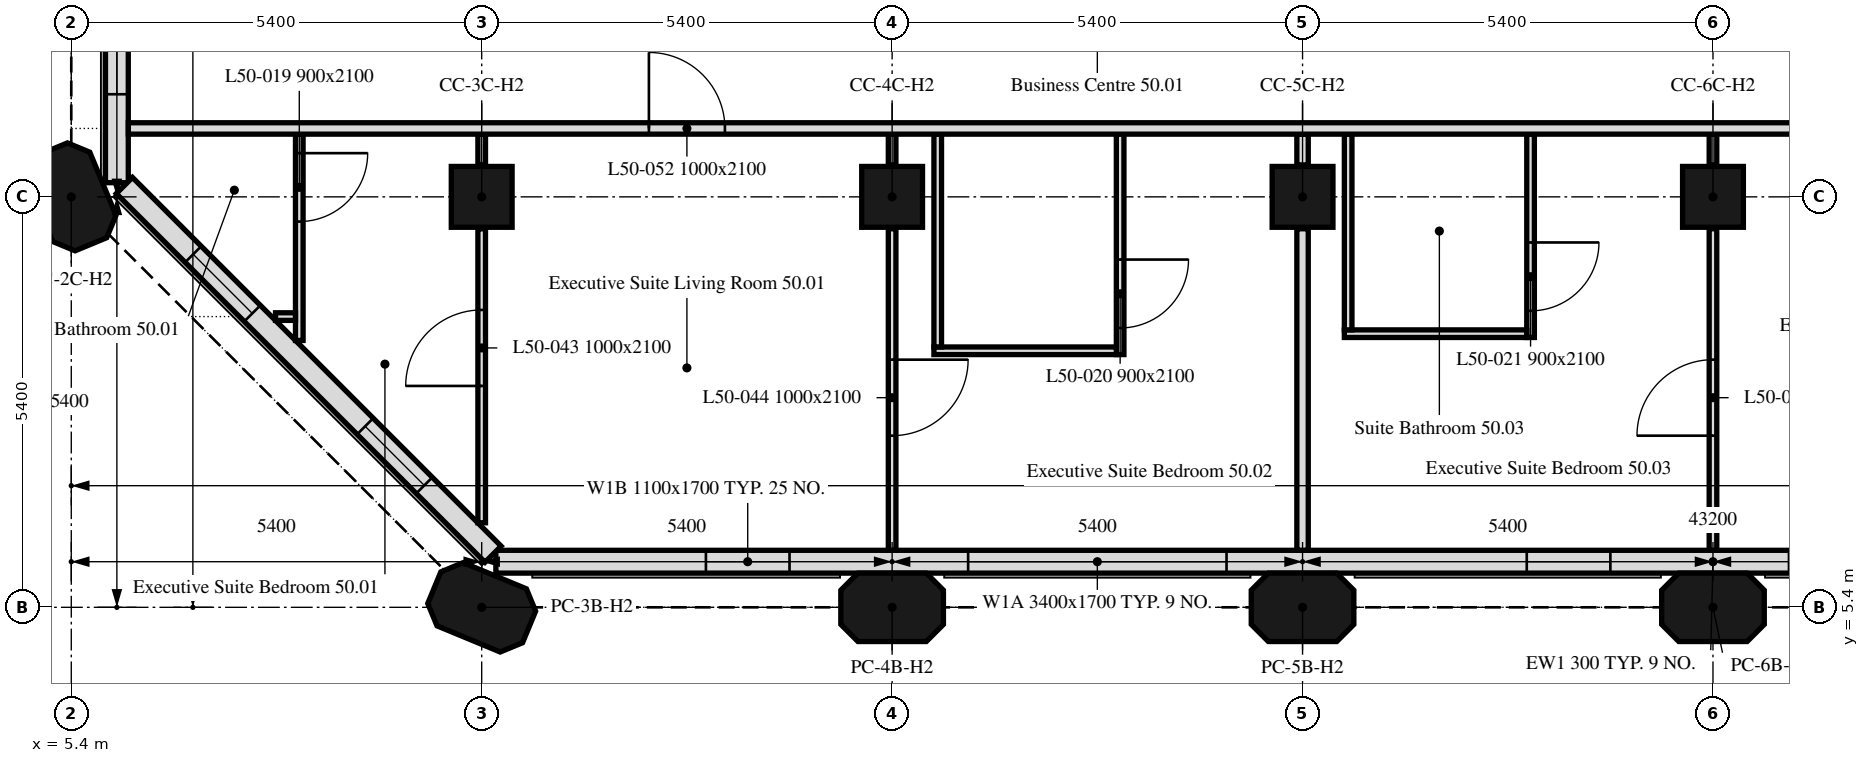
"""IFC4 building model, lengths in metres.
Left out: names, types, materials, properties, quantities, classifications, styles, units other than length and angle.
Written with IfcOpenShell. Run it as: python <this file> out.ifc"""

import sys

from ifc_helpers import new_model, si_unit, direction, frame, frame_2d, origin, origin_2d, place, context, subcontext, project, spatial, polyline, rectangle, outline, extrude, element, fill, save


model = new_model("IFC4")
c1 = context("Model", 3, precision=1e-05, world=origin(), true_north=direction((0.0, 1.0)))
c2 = subcontext(c1, "Body", "Model", "MODEL_VIEW")
j1 = project(units=[si_unit("LENGTHUNIT", "METRE"), si_unit("PLANEANGLEUNIT", "RADIAN")], contexts=[c1])
p1 = place(None, origin())
s1 = spatial("IfcSite", under=j1, at=p1, CompositionType="ELEMENT")
p2 = place(p1, origin())
s2 = spatial("IfcBuilding", under=s1, at=p2, CompositionType="ELEMENT")
p3 = place(p2, frame((0.0, 0.0, 203.8)))
s3 = spatial("IfcBuildingStorey", under=s2, at=p3, CompositionType="ELEMENT", Elevation=203.8)
for number, where, z_axis, x_axis in (
    (1, (10.8, 5.4, 0.0), (0.0, 0.0, 1.0), (-0.924, 0.383, 0.0)),
    (2, (16.2, 5.4, 0.0), (0.0, 0.0, 1.0), (1.0, 0.0, 0.0)),
    (3, (21.6, 5.4, 0.0), (0.0, 0.0, 1.0), (1.0, 0.0, 0.0)),
    (4, (27.0, 5.4, 0.0), (0.0, 0.0, 1.0), (1.0, 0.0, 0.0)),
    (5, (5.4, 10.8, 0.0), (0.0, 0.0, 1.0), (-0.383, 0.924, 0.0)),
):
    element("IfcColumn", number, at=place(p3, frame(where, z_axis=z_axis, x_axis=x_axis)), inside=s3, PredefinedType="COLUMN", context=c2, shape_type="SweptSolid", body=[
        extrude(outline(polyline([(-0.45, -0.45), (0.45, -0.45), (0.675, -0.225), (0.675, 0.225), (0.45, 0.45), (-0.45, 0.45), (-0.675, 0.225), (-0.675, -0.225), (-0.45, -0.45)])), origin(), (0.0, 0.0, 1.0), 3.0),
    ])
for number, where, z_axis, x_axis in (
    (6, (10.8, 10.8, 0.0), (0.0, 0.0, 1.0), (1.0, 0.0, 0.0)),
    (7, (16.2, 10.8, 0.0), (0.0, 0.0, 1.0), (1.0, 0.0, 0.0)),
    (8, (21.6, 10.8, 0.0), (0.0, 0.0, 1.0), (1.0, 0.0, 0.0)),
    (9, (27.0, 10.8, 0.0), (0.0, 0.0, 1.0), (1.0, 0.0, 0.0)),
):
    element("IfcColumn", number, at=place(p3, frame(where, z_axis=z_axis, x_axis=x_axis)), inside=s3, PredefinedType="COLUMN", context=c2, shape_type="SweptSolid", body=[
        extrude(rectangle(XDim=0.8, YDim=0.8, at=origin_2d()), origin(), (0.0, 0.0, 1.0), 3.0),
    ])
p4 = place(p3, frame((10.986, 6.0, 0.0), z_axis=(0.0, 0.0, 1.0), x_axis=(1.0, 0.0, 0.0)))
e10 = element("IfcWall", 10, at=p4, inside=s3, PredefinedType="SOLIDWALL", context=c2, shape_type="SweptSolid", body=[
    extrude(rectangle(XDim=32.027, YDim=0.3, at=frame_2d((16.014, 0.0))), origin(), (0.0, 0.0, 1.0), 3.0),
])
p5 = place(p4, frame((2.764, 0.0, 0.9)))
e11 = element("IfcOpeningElement", 11, at=p5, cuts=e10, PredefinedType="OPENING", context=c2, shape_type="SweptSolid", body=[
    extrude(rectangle(XDim=1.1, YDim=1.7, at=frame_2d((0.55, 0.85))), frame((0.0, 0.16, 0.0), z_axis=(0.0, -1.0, 0.0), x_axis=(1.0, 0.0, 0.0)), (0.0, 0.0, 1.0), 0.32),
])
p6 = place(p4, frame((6.214, 0.0, 0.9)))
e12 = element("IfcOpeningElement", 12, at=p6, cuts=e10, PredefinedType="OPENING", context=c2, shape_type="SweptSolid", body=[
    extrude(rectangle(XDim=3.4, YDim=1.7, at=frame_2d((1.7, 0.85))), frame((0.0, 0.16, 0.0), z_axis=(0.0, -1.0, 0.0), x_axis=(1.0, 0.0, 0.0)), (0.0, 0.0, 1.0), 0.32),
])
p7 = place(p4, frame((13.564, 0.0, 0.9)))
e13 = element("IfcOpeningElement", 13, at=p7, cuts=e10, PredefinedType="OPENING", context=c2, shape_type="SweptSolid", body=[
    extrude(rectangle(XDim=1.1, YDim=1.7, at=frame_2d((0.55, 0.85))), frame((0.0, 0.16, 0.0), z_axis=(0.0, -1.0, 0.0), x_axis=(1.0, 0.0, 0.0)), (0.0, 0.0, 1.0), 0.32),
])
p8 = place(p4, frame((17.014, 0.0, 0.9)))
e14 = element("IfcOpeningElement", 14, at=p8, cuts=e10, PredefinedType="OPENING", context=c2, shape_type="SweptSolid", body=[
    extrude(rectangle(XDim=3.4, YDim=1.7, at=frame_2d((1.7, 0.85))), frame((0.0, 0.16, 0.0), z_axis=(0.0, -1.0, 0.0), x_axis=(1.0, 0.0, 0.0)), (0.0, 0.0, 1.0), 0.32),
])
p9 = place(p4, frame((24.364, 0.0, 0.9)))
e15 = element("IfcOpeningElement", 15, at=p9, cuts=e10, PredefinedType="OPENING", context=c2, shape_type="SweptSolid", body=[
    extrude(rectangle(XDim=1.1, YDim=1.7, at=frame_2d((0.55, 0.85))), frame((0.0, 0.16, 0.0), z_axis=(0.0, -1.0, 0.0), x_axis=(1.0, 0.0, 0.0)), (0.0, 0.0, 1.0), 0.32),
])
p10 = place(p4, frame((27.814, 0.0, 0.9)))
e16 = element("IfcOpeningElement", 16, at=p10, cuts=e10, PredefinedType="OPENING", context=c2, shape_type="SweptSolid", body=[
    extrude(rectangle(XDim=3.4, YDim=1.7, at=frame_2d((1.7, 0.85))), frame((0.0, 0.16, 0.0), z_axis=(0.0, -1.0, 0.0), x_axis=(1.0, 0.0, 0.0)), (0.0, 0.0, 1.0), 0.32),
])
p11 = place(p3, frame((6.0, 16.2, 0.0), z_axis=(0.0, 0.0, 1.0), x_axis=(0.0, -1.0, 0.0)))
e17 = element("IfcWall", 17, at=p11, inside=s3, PredefinedType="SOLIDWALL", context=c2, shape_type="SweptSolid", body=[
    extrude(rectangle(XDim=5.214, YDim=0.3, at=frame_2d((2.607, 0.0))), origin(), (0.0, 0.0, 1.0), 3.0),
])
p12 = place(p11, frame((1.35, 0.0, 0.9)))
e18 = element("IfcOpeningElement", 18, at=p12, cuts=e17, PredefinedType="OPENING", context=c2, shape_type="SweptSolid", body=[
    extrude(rectangle(XDim=1.1, YDim=1.7, at=frame_2d((0.55, 0.85))), frame((0.0, 0.16, 0.0), z_axis=(0.0, -1.0, 0.0), x_axis=(1.0, 0.0, 0.0)), (0.0, 0.0, 1.0), 0.32),
])
p13 = place(p11, frame((2.95, 0.0, 0.9)))
e19 = element("IfcOpeningElement", 19, at=p13, cuts=e17, PredefinedType="OPENING", context=c2, shape_type="SweptSolid", body=[
    extrude(rectangle(XDim=1.1, YDim=1.7, at=frame_2d((0.55, 0.85))), frame((0.0, 0.16, 0.0), z_axis=(0.0, -1.0, 0.0), x_axis=(1.0, 0.0, 0.0)), (0.0, 0.0, 1.0), 0.32),
])
p14 = place(p3, frame((6.099, 10.949, 0.0), z_axis=(0.0, 0.0, 1.0), x_axis=(0.707106781187, -0.707106781187, 0.0)))
e20 = element("IfcWall", 20, at=p14, inside=s3, PredefinedType="SOLIDWALL", context=c2, shape_type="SweptSolid", body=[
    extrude(rectangle(XDim=6.86, YDim=0.3, at=frame_2d((3.43, 0.0))), origin(), (0.0, 0.0, 1.0), 3.0),
])
p15 = place(p14, frame((1.28, 0.0, 0.9)))
e21 = element("IfcOpeningElement", 21, at=p15, cuts=e20, PredefinedType="OPENING", context=c2, shape_type="SweptSolid", body=[
    extrude(rectangle(XDim=1.1, YDim=1.7, at=frame_2d((0.55, 0.85))), frame((0.0, 0.16, 0.0), z_axis=(0.0, -1.0, 0.0), x_axis=(1.0, 0.0, 0.0)), (0.0, 0.0, 1.0), 0.32),
])
p16 = place(p14, frame((4.48, 0.0, 0.9)))
e22 = element("IfcOpeningElement", 22, at=p16, cuts=e20, PredefinedType="OPENING", context=c2, shape_type="SweptSolid", body=[
    extrude(rectangle(XDim=1.1, YDim=1.7, at=frame_2d((0.55, 0.85))), frame((0.0, 0.16, 0.0), z_axis=(0.0, -1.0, 0.0), x_axis=(1.0, 0.0, 0.0)), (0.0, 0.0, 1.0), 0.32),
])
p17 = place(p3, frame((10.8, 6.512, 0.0), z_axis=(0.0, 0.0, 1.0), x_axis=(0.0, 1.0, 0.0)))
e23 = element("IfcWall", 23, at=p17, inside=s3, PredefinedType="PARTITIONING", context=c2, shape_type="SweptSolid", body=[
    extrude(rectangle(XDim=3.868, YDim=0.1, at=frame_2d((1.934, 0.0))), origin(), (0.0, 0.0, 1.0), 3.0),
])
p18 = place(p17, frame((1.8, 0.0, 0.0)))
e24 = element("IfcOpeningElement", 24, at=p18, cuts=e23, PredefinedType="OPENING", context=c2, shape_type="SweptSolid", body=[
    extrude(rectangle(XDim=1.0, YDim=2.1, at=frame_2d((0.5, 1.05))), frame((0.0, 0.05, 0.0), z_axis=(0.0, -1.0, 0.0), x_axis=(1.0, 0.0, 0.0)), (0.0, 0.0, 1.0), 0.1),
])
p19 = place(p3, frame((10.8, 11.22, 0.0), z_axis=(0.0, 0.0, 1.0), x_axis=(0.0, 1.0, 0.0)))
e25 = element("IfcWall", 25, at=p19, inside=s3, PredefinedType="PARTITIONING", context=c2, shape_type="SweptSolid", body=[
    extrude(rectangle(XDim=0.405, YDim=0.1, at=frame_2d((0.203, 0.0))), origin(), (0.0, 0.0, 1.0), 3.0),
])
p20 = place(p3, frame((8.4, 11.625, 0.0), z_axis=(0.0, 0.0, 1.0), x_axis=(0.0, -1.0, 0.0)))
e26 = element("IfcWall", 26, at=p20, inside=s3, PredefinedType="PARTITIONING", context=c2, shape_type="SweptSolid", body=[
    extrude(rectangle(XDim=2.714, YDim=0.1, at=frame_2d((1.357, 0.0))), origin(), (0.0, 0.0, 1.0), 3.0),
])
p21 = place(p20, frame((0.25, 0.0, 0.0)))
e27 = element("IfcOpeningElement", 27, at=p21, cuts=e26, PredefinedType="OPENING", context=c2, shape_type="SweptSolid", body=[
    extrude(rectangle(XDim=0.9, YDim=2.1, at=frame_2d((0.45, 1.05))), frame((0.0, 0.05, 0.0), z_axis=(0.0, -1.0, 0.0), x_axis=(1.0, 0.0, 0.0)), (0.0, 0.0, 1.0), 0.1),
])
p22 = place(p3, frame((8.35, 9.225, 0.0), z_axis=(0.0, 0.0, 1.0), x_axis=(-1.0, 0.0, 0.0)))
e28 = element("IfcWall", 28, at=p22, inside=s3, PredefinedType="PARTITIONING", context=c2, shape_type="SweptSolid", body=[
    extrude(rectangle(XDim=0.263, YDim=0.1, at=frame_2d((0.131, 0.0))), origin(), (0.0, 0.0, 1.0), 3.0),
])
p23 = place(p3, frame((21.6, 6.151, 0.0), z_axis=(0.0, 0.0, 1.0), x_axis=(0.0, 1.0, 0.0)))
e29 = element("IfcWall", 29, at=p23, inside=s3, PredefinedType="PARTITIONING", context=c2, shape_type="SweptSolid", body=[
    extrude(rectangle(XDim=4.229, YDim=0.15, at=frame_2d((2.115, 0.0))), origin(), (0.0, 0.0, 1.0), 3.0),
])
p24 = place(p3, frame((21.6, 11.22, 0.0), z_axis=(0.0, 0.0, 1.0), x_axis=(0.0, 1.0, 0.0)))
e30 = element("IfcWall", 30, at=p24, inside=s3, PredefinedType="PARTITIONING", context=c2, shape_type="SweptSolid", body=[
    extrude(rectangle(XDim=0.405, YDim=0.15, at=frame_2d((0.203, 0.0))), origin(), (0.0, 0.0, 1.0), 3.0),
])
p25 = place(p3, frame((19.2, 11.625, 0.0), z_axis=(0.0, 0.0, 1.0), x_axis=(0.0, -1.0, 0.0)))
e31 = element("IfcWall", 31, at=p25, inside=s3, PredefinedType="PARTITIONING", context=c2, shape_type="SweptSolid", body=[
    extrude(rectangle(XDim=2.9, YDim=0.1, at=frame_2d((1.45, 0.0))), origin(), (0.0, 0.0, 1.0), 3.0),
])
p26 = place(p25, frame((1.65, 0.0, 0.0)))
e32 = element("IfcOpeningElement", 32, at=p26, cuts=e31, PredefinedType="OPENING", context=c2, shape_type="SweptSolid", body=[
    extrude(rectangle(XDim=0.9, YDim=2.1, at=frame_2d((0.45, 1.05))), frame((0.0, 0.05, 0.0), z_axis=(0.0, -1.0, 0.0), x_axis=(1.0, 0.0, 0.0)), (0.0, 0.0, 1.0), 0.1),
])
p27 = place(p3, frame((19.15, 8.775, 0.0), z_axis=(0.0, 0.0, 1.0), x_axis=(-1.0, 0.0, 0.0)))
e33 = element("IfcWall", 33, at=p27, inside=s3, PredefinedType="PARTITIONING", context=c2, shape_type="SweptSolid", body=[
    extrude(rectangle(XDim=2.4, YDim=0.1, at=frame_2d((1.2, 0.0))), origin(), (0.0, 0.0, 1.0), 3.0),
])
p28 = place(p3, frame((16.8, 8.825, 0.0), z_axis=(0.0, 0.0, 1.0), x_axis=(0.0, 1.0, 0.0)))
e34 = element("IfcWall", 34, at=p28, inside=s3, PredefinedType="PARTITIONING", context=c2, shape_type="SweptSolid", body=[
    extrude(rectangle(XDim=2.8, YDim=0.1, at=frame_2d((1.4, 0.0))), origin(), (0.0, 0.0, 1.0), 3.0),
])
p29 = place(p3, frame((16.2, 11.625, 0.0), z_axis=(0.0, 0.0, 1.0), x_axis=(0.0, -1.0, 0.0)))
e35 = element("IfcWall", 35, at=p29, inside=s3, PredefinedType="PARTITIONING", context=c2, shape_type="SweptSolid", body=[
    extrude(rectangle(XDim=0.405, YDim=0.1, at=frame_2d((0.203, 0.0))), origin(), (0.0, 0.0, 1.0), 3.0),
])
p30 = place(p3, frame((16.2, 10.38, 0.0), z_axis=(0.0, 0.0, 1.0), x_axis=(0.0, -1.0, 0.0)))
e36 = element("IfcWall", 36, at=p30, inside=s3, PredefinedType="PARTITIONING", context=c2, shape_type="SweptSolid", body=[
    extrude(rectangle(XDim=4.229, YDim=0.1, at=frame_2d((2.115, 0.0))), origin(), (0.0, 0.0, 1.0), 3.0),
])
p31 = place(p30, frame((1.722, 0.0, 0.0)))
e37 = element("IfcOpeningElement", 37, at=p31, cuts=e36, PredefinedType="OPENING", context=c2, shape_type="SweptSolid", body=[
    extrude(rectangle(XDim=1.0, YDim=2.1, at=frame_2d((0.5, 1.05))), frame((0.0, 0.05, 0.0), z_axis=(0.0, -1.0, 0.0), x_axis=(1.0, 0.0, 0.0)), (0.0, 0.0, 1.0), 0.1),
])
p32 = place(p3, frame((27.0, 6.151, 0.0), z_axis=(0.0, 0.0, 1.0), x_axis=(0.0, 1.0, 0.0)))
e38 = element("IfcWall", 38, at=p32, inside=s3, PredefinedType="PARTITIONING", context=c2, shape_type="SweptSolid", body=[
    extrude(rectangle(XDim=4.229, YDim=0.1, at=frame_2d((2.115, 0.0))), origin(), (0.0, 0.0, 1.0), 3.0),
])
p33 = place(p32, frame((1.507, 0.0, 0.0)))
e39 = element("IfcOpeningElement", 39, at=p33, cuts=e38, PredefinedType="OPENING", context=c2, shape_type="SweptSolid", body=[
    extrude(rectangle(XDim=1.0, YDim=2.1, at=frame_2d((0.5, 1.05))), frame((0.0, 0.05, 0.0), z_axis=(0.0, -1.0, 0.0), x_axis=(1.0, 0.0, 0.0)), (0.0, 0.0, 1.0), 0.1),
])
p34 = place(p3, frame((27.0, 11.22, 0.0), z_axis=(0.0, 0.0, 1.0), x_axis=(0.0, 1.0, 0.0)))
e40 = element("IfcWall", 40, at=p34, inside=s3, PredefinedType="PARTITIONING", context=c2, shape_type="SweptSolid", body=[
    extrude(rectangle(XDim=0.405, YDim=0.1, at=frame_2d((0.203, 0.0))), origin(), (0.0, 0.0, 1.0), 3.0),
])
p35 = place(p3, frame((24.6, 11.625, 0.0), z_axis=(0.0, 0.0, 1.0), x_axis=(0.0, -1.0, 0.0)))
e41 = element("IfcWall", 41, at=p35, inside=s3, PredefinedType="PARTITIONING", context=c2, shape_type="SweptSolid", body=[
    extrude(rectangle(XDim=2.675, YDim=0.1, at=frame_2d((1.337, 0.0))), origin(), (0.0, 0.0, 1.0), 3.0),
])
p36 = place(p35, frame((1.425, 0.0, 0.0)))
e42 = element("IfcOpeningElement", 42, at=p36, cuts=e41, PredefinedType="OPENING", context=c2, shape_type="SweptSolid", body=[
    extrude(rectangle(XDim=0.9, YDim=2.1, at=frame_2d((0.45, 1.05))), frame((0.0, 0.05, 0.0), z_axis=(0.0, -1.0, 0.0), x_axis=(1.0, 0.0, 0.0)), (0.0, 0.0, 1.0), 0.1),
])
p37 = place(p3, frame((24.55, 9.0, 0.0), z_axis=(0.0, 0.0, 1.0), x_axis=(-1.0, 0.0, 0.0)))
e43 = element("IfcWall", 43, at=p37, inside=s3, PredefinedType="PARTITIONING", context=c2, shape_type="SweptSolid", body=[
    extrude(rectangle(XDim=2.4, YDim=0.1, at=frame_2d((1.2, 0.0))), origin(), (0.0, 0.0, 1.0), 3.0),
])
p38 = place(p3, frame((22.2, 9.05, 0.0), z_axis=(0.0, 0.0, 1.0), x_axis=(0.0, 1.0, 0.0)))
e44 = element("IfcWall", 44, at=p38, inside=s3, PredefinedType="PARTITIONING", context=c2, shape_type="SweptSolid", body=[
    extrude(rectangle(XDim=2.575, YDim=0.1, at=frame_2d((1.288, 0.0))), origin(), (0.0, 0.0, 1.0), 3.0),
])
p39 = place(p3, frame((6.151, 11.7, 0.0), z_axis=(0.0, 0.0, 1.0), x_axis=(1.0, 0.0, 0.0)))
e45 = element("IfcWall", 45, at=p39, inside=s3, PredefinedType="PARTITIONING", context=c2, shape_type="SweptSolid", body=[
    extrude(rectangle(XDim=41.698, YDim=0.15, at=frame_2d((20.849, 0.0))), origin(), (0.0, 0.0, 1.0), 3.0),
])
p40 = place(p39, frame((37.954, 0.0, 0.0)))
e46 = element("IfcOpeningElement", 46, at=p40, cuts=e45, PredefinedType="OPENING", context=c2, shape_type="SweptSolid", body=[
    extrude(rectangle(XDim=1.0, YDim=2.1, at=frame_2d((0.5, 1.05))), frame((0.0, 0.075, 0.0), z_axis=(0.0, -1.0, 0.0), x_axis=(1.0, 0.0, 0.0)), (0.0, 0.0, 1.0), 0.15),
])
p41 = place(p39, frame((6.849, 0.0, 0.0)))
e47 = element("IfcOpeningElement", 47, at=p41, cuts=e45, PredefinedType="OPENING", context=c2, shape_type="SweptSolid", body=[
    extrude(rectangle(XDim=1.0, YDim=2.1, at=frame_2d((0.5, 1.05))), frame((0.0, 0.075, 0.0), z_axis=(0.0, -1.0, 0.0), x_axis=(1.0, 0.0, 0.0)), (0.0, 0.0, 1.0), 0.15),
])
p42 = place(p39, frame((23.049, 0.0, 0.0)))
e48 = element("IfcOpeningElement", 48, at=p42, cuts=e45, PredefinedType="OPENING", context=c2, shape_type="SweptSolid", body=[
    extrude(rectangle(XDim=1.0, YDim=2.1, at=frame_2d((0.5, 1.05))), frame((0.0, 0.075, 0.0), z_axis=(0.0, -1.0, 0.0), x_axis=(1.0, 0.0, 0.0)), (0.0, 0.0, 1.0), 0.15),
])
p43 = place(p5, origin())
e49 = element("IfcWindow", 49, at=p43, inside=s3, PartitioningType="SINGLE_PANEL", PredefinedType="WINDOW", context=c2, shape_type="SweptSolid", body=[
    extrude(rectangle(XDim=1.1, YDim=1.7, at=frame_2d((0.55, 0.85))), frame((0.0, 0.03, 0.0), z_axis=(0.0, -1.0, 0.0), x_axis=(1.0, 0.0, 0.0)), (0.0, 0.0, 1.0), 0.06),
])
fill(e11, e49)
p44 = place(p6, origin())
e50 = element("IfcWindow", 50, at=p44, inside=s3, PartitioningType="SINGLE_PANEL", PredefinedType="WINDOW", context=c2, shape_type="SweptSolid", body=[
    extrude(rectangle(XDim=3.4, YDim=1.7, at=frame_2d((1.7, 0.85))), frame((0.0, 0.03, 0.0), z_axis=(0.0, -1.0, 0.0), x_axis=(1.0, 0.0, 0.0)), (0.0, 0.0, 1.0), 0.06),
])
fill(e12, e50)
p45 = place(p7, origin())
e51 = element("IfcWindow", 51, at=p45, inside=s3, PartitioningType="SINGLE_PANEL", PredefinedType="WINDOW", context=c2, shape_type="SweptSolid", body=[
    extrude(rectangle(XDim=1.1, YDim=1.7, at=frame_2d((0.55, 0.85))), frame((0.0, 0.03, 0.0), z_axis=(0.0, -1.0, 0.0), x_axis=(1.0, 0.0, 0.0)), (0.0, 0.0, 1.0), 0.06),
])
fill(e13, e51)
p46 = place(p13, origin())
e52 = element("IfcWindow", 52, at=p46, inside=s3, PartitioningType="SINGLE_PANEL", PredefinedType="WINDOW", context=c2, shape_type="SweptSolid", body=[
    extrude(rectangle(XDim=1.1, YDim=1.7, at=frame_2d((0.55, 0.85))), frame((0.0, 0.03, 0.0), z_axis=(0.0, -1.0, 0.0), x_axis=(1.0, 0.0, 0.0)), (0.0, 0.0, 1.0), 0.06),
])
fill(e19, e52)
p47 = place(p15, origin())
e53 = element("IfcWindow", 53, at=p47, inside=s3, PartitioningType="SINGLE_PANEL", PredefinedType="WINDOW", context=c2, shape_type="SweptSolid", body=[
    extrude(rectangle(XDim=1.1, YDim=1.7, at=frame_2d((0.55, 0.85))), frame((0.0, 0.03, 0.0), z_axis=(0.0, -1.0, 0.0), x_axis=(1.0, 0.0, 0.0)), (0.0, 0.0, 1.0), 0.06),
])
fill(e21, e53)
p48 = place(p16, origin())
e54 = element("IfcWindow", 54, at=p48, inside=s3, PartitioningType="SINGLE_PANEL", PredefinedType="WINDOW", context=c2, shape_type="SweptSolid", body=[
    extrude(rectangle(XDim=1.1, YDim=1.7, at=frame_2d((0.55, 0.85))), frame((0.0, 0.03, 0.0), z_axis=(0.0, -1.0, 0.0), x_axis=(1.0, 0.0, 0.0)), (0.0, 0.0, 1.0), 0.06),
])
fill(e22, e54)
p49 = place(p21, origin())
e55 = element("IfcDoor", 55, at=p49, inside=s3, OperationType="SINGLE_SWING_LEFT", PredefinedType="DOOR", context=c2, shape_type="SweptSolid", body=[
    extrude(rectangle(XDim=0.9, YDim=2.1, at=frame_2d((0.45, 1.05))), frame((0.0, 0.025, 0.0), z_axis=(0.0, -1.0, 0.0), x_axis=(1.0, 0.0, 0.0)), (0.0, 0.0, 1.0), 0.05),
])
fill(e27, e55)
p50 = place(p26, origin())
e56 = element("IfcDoor", 56, at=p50, inside=s3, OperationType="SINGLE_SWING_RIGHT", PredefinedType="DOOR", context=c2, shape_type="SweptSolid", body=[
    extrude(rectangle(XDim=0.9, YDim=2.1, at=frame_2d((0.45, 1.05))), frame((0.0, 0.025, 0.0), z_axis=(0.0, -1.0, 0.0), x_axis=(1.0, 0.0, 0.0)), (0.0, 0.0, 1.0), 0.05),
])
fill(e32, e56)
p51 = place(p36, origin())
e57 = element("IfcDoor", 57, at=p51, inside=s3, OperationType="SINGLE_SWING_LEFT", PredefinedType="DOOR", context=c2, shape_type="SweptSolid", body=[
    extrude(rectangle(XDim=0.9, YDim=2.1, at=frame_2d((0.45, 1.05))), frame((0.0, 0.025, 0.0), z_axis=(0.0, -1.0, 0.0), x_axis=(1.0, 0.0, 0.0)), (0.0, 0.0, 1.0), 0.05),
])
fill(e42, e57)
p52 = place(p18, origin())
e58 = element("IfcDoor", 58, at=p52, inside=s3, OperationType="SINGLE_SWING_LEFT", PredefinedType="DOOR", context=c2, shape_type="SweptSolid", body=[
    extrude(rectangle(XDim=1.0, YDim=2.1, at=frame_2d((0.5, 1.05))), frame((0.0, 0.025, 0.0), z_axis=(0.0, -1.0, 0.0), x_axis=(1.0, 0.0, 0.0)), (0.0, 0.0, 1.0), 0.05),
])
fill(e24, e58)
p53 = place(p31, origin())
e59 = element("IfcDoor", 59, at=p53, inside=s3, OperationType="SINGLE_SWING_LEFT", PredefinedType="DOOR", context=c2, shape_type="SweptSolid", body=[
    extrude(rectangle(XDim=1.0, YDim=2.1, at=frame_2d((0.5, 1.05))), frame((0.0, 0.025, 0.0), z_axis=(0.0, -1.0, 0.0), x_axis=(1.0, 0.0, 0.0)), (0.0, 0.0, 1.0), 0.05),
])
fill(e37, e59)
p54 = place(p33, origin())
e60 = element("IfcDoor", 60, at=p54, inside=s3, OperationType="SINGLE_SWING_LEFT", PredefinedType="DOOR", context=c2, shape_type="SweptSolid", body=[
    extrude(rectangle(XDim=1.0, YDim=2.1, at=frame_2d((0.5, 1.05))), frame((0.0, 0.025, 0.0), z_axis=(0.0, -1.0, 0.0), x_axis=(1.0, 0.0, 0.0)), (0.0, 0.0, 1.0), 0.05),
])
fill(e39, e60)
p55 = place(p41, origin())
e61 = element("IfcDoor", 61, at=p55, inside=s3, OperationType="SINGLE_SWING_RIGHT", PredefinedType="DOOR", context=c2, shape_type="SweptSolid", body=[
    extrude(rectangle(XDim=1.0, YDim=2.1, at=frame_2d((0.5, 1.05))), frame((0.0, 0.025, 0.0), z_axis=(0.0, -1.0, 0.0), x_axis=(1.0, 0.0, 0.0)), (0.0, 0.0, 1.0), 0.05),
])
fill(e47, e61)
save(model, sys.argv[1])
